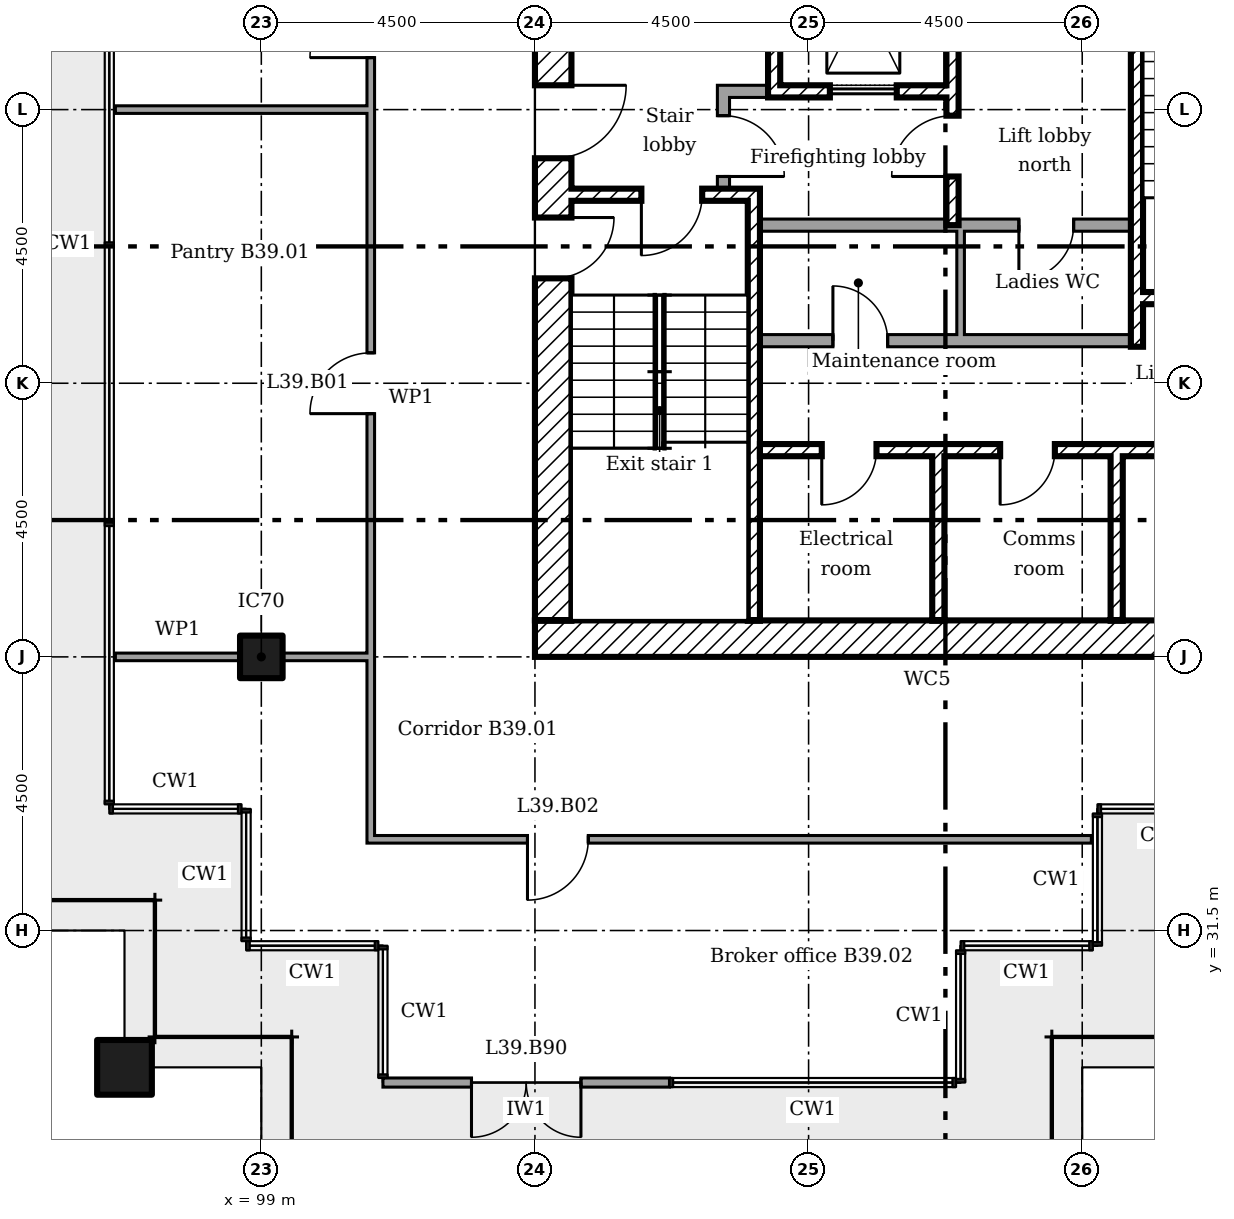
"""IFC4 building model, lengths in metres.
Left out: names, types, materials, properties, quantities, classifications, styles, units other than length and angle.
Written with IfcOpenShell. Run it as: python <this file> out.ifc"""

import sys

from ifc_helpers import new_model, si_unit, direction, frame, frame_2d, origin, origin_2d, place, context, subcontext, project, spatial, rectangle, extrude, element, fill, save


model = new_model("IFC4")
c1 = context("Model", 3, precision=1e-05, world=origin(), true_north=direction((0.0, 1.0)))
c2 = subcontext(c1, "Body", "Model", "MODEL_VIEW")
j1 = project(units=[si_unit("LENGTHUNIT", "METRE"), si_unit("PLANEANGLEUNIT", "RADIAN")], contexts=[c1])
p1 = place(None, origin())
s1 = spatial("IfcSite", under=j1, at=p1, CompositionType="ELEMENT")
p2 = place(p1, origin())
s2 = spatial("IfcBuilding", under=s1, at=p2, CompositionType="ELEMENT")
p3 = place(p2, frame((0.0, 0.0, 158.2)))
s3 = spatial("IfcBuildingStorey", under=s2, at=p3, CompositionType="ELEMENT", Elevation=158.2)
p4 = place(p3, frame((96.75, 29.25, 0.0)))
e1 = element("IfcColumn", 1, at=p4, inside=s3, PredefinedType="COLUMN", context=c2, shape_type="SweptSolid", body=[
    extrude(rectangle(XDim=0.9, YDim=0.9, at=origin_2d()), origin(), (0.0, 0.0, 1.0), 3.6),
])
p5 = place(p3, frame((99.0, 36.0, 0.0)))
e2 = element("IfcColumn", 2, at=p5, inside=s3, PredefinedType="COLUMN", context=c2, shape_type="SweptSolid", body=[
    extrude(rectangle(XDim=0.7, YDim=0.7, at=origin_2d()), origin(), (0.0, 0.0, 1.0), 3.6),
])
p6 = place(p3, frame((101.0, 29.0, 0.0)))
e3 = element("IfcWall", 3, at=p6, inside=s3, PredefinedType="SOLIDWALL", context=c2, shape_type="SweptSolid", body=[
    extrude(rectangle(XDim=4.712, YDim=0.15, at=frame_2d((2.356, 0.0))), origin(), (0.0, 0.0, 1.0), 3.45),
])
p7 = place(p6, frame((1.456, 0.0, 0.0)))
e4 = element("IfcOpeningElement", 4, at=p7, cuts=e3, PredefinedType="OPENING", context=c2, shape_type="SweptSolid", body=[
    extrude(rectangle(XDim=1.8, YDim=2.4, at=frame_2d((0.9, 1.2))), frame((0.0, 0.085, 0.0), z_axis=(0.0, -1.0, 0.0), x_axis=(1.0, 0.0, 0.0)), (0.0, 0.0, 1.0), 0.17),
])
p8 = place(p3, frame((103.5, 36.3, 0.0)))
e5 = element("IfcWall", 5, at=p8, inside=s3, PredefinedType="SHEAR", context=c2, shape_type="SweptSolid", body=[
    extrude(rectangle(XDim=12.9, YDim=0.6, at=frame_2d((6.45, 0.0))), origin(), (0.0, 0.0, 1.0), 3.35),
])
p9 = place(p3, frame((103.8, 36.6, 0.0), z_axis=(0.0, 0.0, 1.0), x_axis=(0.0, 1.0, 0.0)))
e6 = element("IfcWall", 6, at=p9, inside=s3, PredefinedType="SHEAR", context=c2, shape_type="SweptSolid", body=[
    extrude(rectangle(XDim=12.3, YDim=0.6, at=frame_2d((6.15, 0.0))), origin(), (0.0, 0.0, 1.0), 3.35),
])
p10 = place(p9, frame((7.6, 0.0, 0.0)))
e7 = element("IfcOpeningElement", 7, at=p10, cuts=e6, PredefinedType="OPENING", context=c2, shape_type="SweptSolid", body=[
    extrude(rectangle(XDim=1.2, YDim=2.1, at=frame_2d((0.6, 1.05))), frame((0.0, 0.31, 0.0), z_axis=(0.0, -1.0, 0.0), x_axis=(1.0, 0.0, 0.0)), (0.0, 0.0, 1.0), 0.62),
])
p11 = place(p9, frame((5.625, 0.0, 0.0)))
e8 = element("IfcOpeningElement", 8, at=p11, cuts=e6, PredefinedType="OPENING", context=c2, shape_type="SweptSolid", body=[
    extrude(rectangle(XDim=1.0, YDim=2.1, at=frame_2d((0.5, 1.05))), frame((0.0, 0.31, 0.0), z_axis=(0.0, -1.0, 0.0), x_axis=(1.0, 0.0, 0.0)), (0.0, 0.0, 1.0), 0.62),
])
p12 = place(p3, frame((107.433, 48.9, 0.0), z_axis=(0.0, 0.0, 1.0), x_axis=(0.0, -1.0, 0.0)))
e9 = element("IfcWall", 9, at=p12, inside=s3, PredefinedType="SHEAR", context=c2, shape_type="SweptSolid", body=[
    extrude(rectangle(XDim=3.7, YDim=0.2, at=frame_2d((1.85, 0.0))), origin(), (0.0, 0.0, 1.0), 3.35),
])
p13 = place(p3, frame((110.367, 48.9, 0.0), z_axis=(0.0, 0.0, 1.0), x_axis=(0.0, -1.0, 0.0)))
e10 = element("IfcWall", 10, at=p13, inside=s3, PredefinedType="SHEAR", context=c2, shape_type="SweptSolid", body=[
    extrude(rectangle(XDim=5.8, YDim=0.2, at=frame_2d((2.9, 0.0))), origin(), (0.0, 0.0, 1.0), 3.35),
])
p14 = place(p13, frame((4.0, 0.0, 0.0)))
e11 = element("IfcOpeningElement", 11, at=p14, cuts=e10, PredefinedType="OPENING", context=c2, shape_type="SweptSolid", body=[
    extrude(rectangle(XDim=1.0, YDim=2.1, at=frame_2d((0.5, 1.05))), frame((0.0, 0.11, 0.0), z_axis=(0.0, -1.0, 0.0), x_axis=(1.0, 0.0, 0.0)), (0.0, 0.0, 1.0), 0.22),
])
for number, where, z_axis, x_axis in (
    (12, (110.133, 36.6, 0.0), (0.0, 0.0, 1.0), (0.0, 1.0, 0.0)),
    (13, (113.067, 36.6, 0.0), (0.0, 0.0, 1.0), (0.0, 1.0, 0.0)),
):
    element("IfcWall", number, at=place(p3, frame(where, z_axis=z_axis, x_axis=x_axis)), inside=s3, PredefinedType="SHEAR", context=c2, shape_type="SweptSolid", body=[
        extrude(rectangle(XDim=2.7, YDim=0.2, at=frame_2d((1.35, 0.0))), origin(), (0.0, 0.0, 1.0), 3.35),
    ])
p15 = place(p3, frame((106.5, 45.3, 0.0)))
e14 = element("IfcWall", 14, at=p15, inside=s3, PredefinedType="PARTITIONING", context=c2, shape_type="SweptSolid", body=[
    extrude(rectangle(XDim=0.833, YDim=0.2, at=frame_2d((0.417, 0.0))), origin(), (0.0, 0.0, 1.0), 3.35),
])
p16 = place(p3, frame((106.6, 43.7, 0.0), z_axis=(0.0, 0.0, 1.0), x_axis=(0.0, 1.0, 0.0)))
e15 = element("IfcWall", 15, at=p16, inside=s3, PredefinedType="PARTITIONING", context=c2, shape_type="SweptSolid", body=[
    extrude(rectangle(XDim=1.5, YDim=0.2, at=frame_2d((0.75, 0.0))), origin(), (0.0, 0.0, 1.0), 3.35),
])
p17 = place(p16, frame((0.2, 0.0, 0.0)))
e16 = element("IfcOpeningElement", 16, at=p17, cuts=e15, PredefinedType="OPENING", context=c2, shape_type="SweptSolid", body=[
    extrude(rectangle(XDim=1.0, YDim=2.1, at=frame_2d((0.5, 1.05))), frame((0.0, 0.11, 0.0), z_axis=(0.0, -1.0, 0.0), x_axis=(1.0, 0.0, 0.0)), (0.0, 0.0, 1.0), 0.22),
])
p18 = place(p3, frame((107.533, 45.3, 0.0)))
e17 = element("IfcWall", 17, at=p18, inside=s3, PredefinedType="SHEAR", context=c2, shape_type="SweptSolid", body=[
    extrude(rectangle(XDim=2.733, YDim=0.2, at=frame_2d((1.367, 0.0))), origin(), (0.0, 0.0, 1.0), 3.35),
])
p19 = place(p18, frame((0.817, 0.0, 0.0)))
e18 = element("IfcOpeningElement", 18, at=p19, cuts=e17, PredefinedType="OPENING", context=c2, shape_type="SweptSolid", body=[
    extrude(rectangle(XDim=1.1, YDim=2.1, at=frame_2d((0.55, 1.05))), frame((0.0, 0.11, 0.0), z_axis=(0.0, -1.0, 0.0), x_axis=(1.0, 0.0, 0.0)), (0.0, 0.0, 1.0), 0.22),
])
p20 = place(p3, frame((107.2, 39.4, 0.0)))
e19 = element("IfcWall", 19, at=p20, inside=s3, PredefinedType="SHEAR", context=c2, shape_type="SweptSolid", body=[
    extrude(rectangle(XDim=9.2, YDim=0.2, at=frame_2d((4.6, 0.0))), origin(), (0.0, 0.0, 1.0), 3.35),
])
p21 = place(p20, frame((1.017, 0.0, 0.0)))
e20 = element("IfcOpeningElement", 20, at=p21, cuts=e19, PredefinedType="OPENING", context=c2, shape_type="SweptSolid", body=[
    extrude(rectangle(XDim=0.9, YDim=2.1, at=frame_2d((0.45, 1.05))), frame((0.0, 0.11, 0.0), z_axis=(0.0, -1.0, 0.0), x_axis=(1.0, 0.0, 0.0)), (0.0, 0.0, 1.0), 0.22),
])
p22 = place(p20, frame((3.95, 0.0, 0.0)))
e21 = element("IfcOpeningElement", 21, at=p22, cuts=e19, PredefinedType="OPENING", context=c2, shape_type="SweptSolid", body=[
    extrude(rectangle(XDim=0.9, YDim=2.1, at=frame_2d((0.45, 1.05))), frame((0.0, 0.11, 0.0), z_axis=(0.0, -1.0, 0.0), x_axis=(1.0, 0.0, 0.0)), (0.0, 0.0, 1.0), 0.22),
])
p23 = place(p20, frame((6.883, 0.0, 0.0)))
e22 = element("IfcOpeningElement", 22, at=p23, cuts=e19, PredefinedType="OPENING", context=c2, shape_type="SweptSolid", body=[
    extrude(rectangle(XDim=0.9, YDim=2.1, at=frame_2d((0.45, 1.05))), frame((0.0, 0.11, 0.0), z_axis=(0.0, -1.0, 0.0), x_axis=(1.0, 0.0, 0.0)), (0.0, 0.0, 1.0), 0.22),
])
p24 = place(p3, frame((107.1, 36.6, 0.0), z_axis=(0.0, 0.0, 1.0), x_axis=(0.0, 1.0, 0.0)))
e23 = element("IfcWall", 23, at=p24, inside=s3, PredefinedType="SHEAR", context=c2, shape_type="SweptSolid", body=[
    extrude(rectangle(XDim=7.1, YDim=0.2, at=frame_2d((3.55, 0.0))), origin(), (0.0, 0.0, 1.0), 3.35),
])
p25 = place(p3, frame((104.1, 43.6, 0.0)))
e24 = element("IfcWall", 24, at=p25, inside=s3, PredefinedType="SHEAR", context=c2, shape_type="SweptSolid", body=[
    extrude(rectangle(XDim=2.9, YDim=0.2, at=frame_2d((1.45, 0.0))), origin(), (0.0, 0.0, 1.0), 3.35),
])
p26 = place(p25, frame((1.15, 0.0, 0.0)))
e25 = element("IfcOpeningElement", 25, at=p26, cuts=e24, PredefinedType="OPENING", context=c2, shape_type="SweptSolid", body=[
    extrude(rectangle(XDim=1.0, YDim=2.1, at=frame_2d((0.5, 1.05))), frame((0.0, 0.11, 0.0), z_axis=(0.0, -1.0, 0.0), x_axis=(1.0, 0.0, 0.0)), (0.0, 0.0, 1.0), 0.22),
])
p27 = place(p3, frame((113.5, 41.9, 0.0)))
e26 = element("IfcWall", 26, at=p27, inside=s3, PredefinedType="SHEAR", context=c2, shape_type="SweptSolid", body=[
    extrude(rectangle(XDim=2.9, YDim=0.2, at=frame_2d((1.45, 0.0))), origin(), (0.0, 0.0, 1.0), 3.35),
])
p28 = place(p27, frame((0.75, 0.0, 0.0)))
e27 = element("IfcOpeningElement", 27, at=p28, cuts=e26, PredefinedType="OPENING", context=c2, shape_type="SweptSolid", body=[
    extrude(rectangle(XDim=1.0, YDim=2.1, at=frame_2d((0.5, 1.05))), frame((0.0, 0.11, 0.0), z_axis=(0.0, -1.0, 0.0), x_axis=(1.0, 0.0, 0.0)), (0.0, 0.0, 1.0), 0.22),
])
p29 = place(p3, frame((113.4, 41.1, 0.0), z_axis=(0.0, 0.0, 1.0), x_axis=(0.0, 1.0, 0.0)))
e28 = element("IfcWall", 28, at=p29, inside=s3, PredefinedType="SHEAR", context=c2, shape_type="SweptSolid", body=[
    extrude(rectangle(XDim=7.8, YDim=0.2, at=frame_2d((3.9, 0.0))), origin(), (0.0, 0.0, 1.0), 3.35),
])
p30 = place(p3, frame((107.2, 43.1, 0.0)))
e29 = element("IfcWall", 29, at=p30, inside=s3, PredefinedType="PARTITIONING", context=c2, shape_type="SweptSolid", body=[
    extrude(rectangle(XDim=6.1, YDim=0.2, at=frame_2d((3.05, 0.0))), origin(), (0.0, 0.0, 1.0), 3.35),
])
p31 = place(p30, frame((4.259, 0.0, 0.0)))
e30 = element("IfcOpeningElement", 30, at=p31, cuts=e29, PredefinedType="OPENING", context=c2, shape_type="SweptSolid", body=[
    extrude(rectangle(XDim=0.9, YDim=2.1, at=frame_2d((0.45, 1.05))), frame((0.0, 0.11, 0.0), z_axis=(0.0, -1.0, 0.0), x_axis=(1.0, 0.0, 0.0)), (0.0, 0.0, 1.0), 0.22),
])
p32 = place(p3, frame((107.2, 41.2, 0.0)))
e31 = element("IfcWall", 31, at=p32, inside=s3, PredefinedType="PARTITIONING", context=c2, shape_type="SweptSolid", body=[
    extrude(rectangle(XDim=6.1, YDim=0.2, at=frame_2d((3.05, 0.0))), origin(), (0.0, 0.0, 1.0), 3.35),
])
p33 = place(p32, frame((1.2, 0.0, 0.0)))
e32 = element("IfcOpeningElement", 32, at=p33, cuts=e31, PredefinedType="OPENING", context=c2, shape_type="SweptSolid", body=[
    extrude(rectangle(XDim=0.9, YDim=2.1, at=frame_2d((0.45, 1.05))), frame((0.0, 0.11, 0.0), z_axis=(0.0, -1.0, 0.0), x_axis=(1.0, 0.0, 0.0)), (0.0, 0.0, 1.0), 0.22),
])
p34 = place(p3, frame((110.5, 41.3, 0.0), z_axis=(0.0, 0.0, 1.0), x_axis=(0.0, 1.0, 0.0)))
e33 = element("IfcWall", 33, at=p34, inside=s3, PredefinedType="PARTITIONING", context=c2, shape_type="SweptSolid", body=[
    extrude(rectangle(XDim=1.7, YDim=0.125, at=frame_2d((0.85, 0.0))), origin(), (0.0, 0.0, 1.0), 3.35),
])
p35 = place(p3, frame((100.738, 33.0, 0.0)))
e34 = element("IfcWall", 34, at=p35, inside=s3, PredefinedType="PARTITIONING", context=c2, shape_type="SweptSolid", body=[
    extrude(rectangle(XDim=11.912, YDim=0.125, at=frame_2d((5.956, 0.0))), origin(), (0.0, 0.0, 1.0), 3.45),
])
p36 = place(p35, frame((2.639, 0.0, 0.0)))
e35 = element("IfcOpeningElement", 35, at=p36, cuts=e34, PredefinedType="OPENING", context=c2, shape_type="SweptSolid", body=[
    extrude(rectangle(XDim=1.0, YDim=2.1, at=frame_2d((0.5, 1.05))), frame((0.0, 0.073, 0.0), z_axis=(0.0, -1.0, 0.0), x_axis=(1.0, 0.0, 0.0)), (0.0, 0.0, 1.0), 0.145),
])
p37 = place(p3, frame((96.6, 36.0, 0.0)))
e36 = element("IfcWall", 36, at=p37, inside=s3, PredefinedType="PARTITIONING", context=c2, shape_type="SweptSolid", body=[
    extrude(rectangle(XDim=2.05, YDim=0.125, at=frame_2d((1.025, 0.0))), origin(), (0.0, 0.0, 1.0), 2.842),
])
p38 = place(p3, frame((99.35, 36.0, 0.0)))
e37 = element("IfcWall", 37, at=p38, inside=s3, PredefinedType="PARTITIONING", context=c2, shape_type="SweptSolid", body=[
    extrude(rectangle(XDim=1.45, YDim=0.125, at=frame_2d((0.725, 0.0))), origin(), (0.0, 0.0, 1.0), 2.842),
])
p39 = place(p3, frame((96.6, 45.0, 0.0)))
e38 = element("IfcWall", 38, at=p39, inside=s3, PredefinedType="PARTITIONING", context=c2, shape_type="SweptSolid", body=[
    extrude(rectangle(XDim=4.2, YDim=0.125, at=frame_2d((2.1, 0.0))), origin(), (0.0, 0.0, 1.0), 2.851),
])
p40 = place(p3, frame((100.8, 33.062, 0.0), z_axis=(0.0, 0.0, 1.0), x_axis=(0.0, 1.0, 0.0)))
e39 = element("IfcWall", 39, at=p40, inside=s3, PredefinedType="PARTITIONING", context=c2, shape_type="SweptSolid", body=[
    extrude(rectangle(XDim=14.375, YDim=0.125, at=frame_2d((7.188, 0.0))), origin(), (0.0, 0.0, 1.0), 3.45),
])
p41 = place(p40, frame((6.938, 0.0, 0.0)))
e40 = element("IfcOpeningElement", 40, at=p41, cuts=e39, PredefinedType="OPENING", context=c2, shape_type="SweptSolid", body=[
    extrude(rectangle(XDim=1.0, YDim=2.1, at=frame_2d((0.5, 1.05))), frame((0.0, 0.073, 0.0), z_axis=(0.0, -1.0, 0.0), x_axis=(1.0, 0.0, 0.0)), (0.0, 0.0, 1.0), 0.145),
])
p42 = place(p40, frame((12.792, 0.0, 0.0)))
e41 = element("IfcOpeningElement", 41, at=p42, cuts=e39, PredefinedType="OPENING", context=c2, shape_type="SweptSolid", body=[
    extrude(rectangle(XDim=1.0, YDim=2.1, at=frame_2d((0.5, 1.05))), frame((0.0, 0.073, 0.0), z_axis=(0.0, -1.0, 0.0), x_axis=(1.0, 0.0, 0.0)), (0.0, 0.0, 1.0), 0.145),
])
p43 = place(p7, frame((1.8, 0.0, 0.0), x_axis=(-1.0, 0.0, 0.0)))
e42 = element("IfcDoor", 42, at=p43, inside=s3, OperationType="DOUBLE_DOOR_DOUBLE_SWING", PredefinedType="NOTDEFINED", context=c2, shape_type="SweptSolid", body=[
    extrude(rectangle(XDim=1.8, YDim=2.4, at=frame_2d((0.9, 1.2))), frame((0.0, 0.025, 0.0), z_axis=(0.0, -1.0, 0.0), x_axis=(1.0, 0.0, 0.0)), (0.0, 0.0, 1.0), 0.05),
])
fill(e4, e42)
p44 = place(p10, frame((1.2, 0.0, 0.0), x_axis=(-1.0, 0.0, 0.0)))
e43 = element("IfcDoor", 43, at=p44, inside=s3, OperationType="SINGLE_SWING_RIGHT", PredefinedType="DOOR", context=c2, shape_type="SweptSolid", body=[
    extrude(rectangle(XDim=1.2, YDim=2.1, at=frame_2d((0.6, 1.05))), frame((0.0, 0.025, 0.0), z_axis=(0.0, -1.0, 0.0), x_axis=(1.0, 0.0, 0.0)), (0.0, 0.0, 1.0), 0.05),
])
fill(e7, e43)
p45 = place(p26, frame((1.0, 0.0, 0.0), x_axis=(-1.0, 0.0, 0.0)))
e44 = element("IfcDoor", 44, at=p45, inside=s3, OperationType="SINGLE_SWING_LEFT", PredefinedType="DOOR", context=c2, shape_type="SweptSolid", body=[
    extrude(rectangle(XDim=1.0, YDim=2.1, at=frame_2d((0.5, 1.05))), frame((0.0, 0.025, 0.0), z_axis=(0.0, -1.0, 0.0), x_axis=(1.0, 0.0, 0.0)), (0.0, 0.0, 1.0), 0.05),
])
fill(e25, e44)
p46 = place(p11, frame((1.0, 0.0, 0.0), x_axis=(-1.0, 0.0, 0.0)))
e45 = element("IfcDoor", 45, at=p46, inside=s3, OperationType="SINGLE_SWING_RIGHT", PredefinedType="DOOR", context=c2, shape_type="SweptSolid", body=[
    extrude(rectangle(XDim=1.0, YDim=2.1, at=frame_2d((0.5, 1.05))), frame((0.0, 0.025, 0.0), z_axis=(0.0, -1.0, 0.0), x_axis=(1.0, 0.0, 0.0)), (0.0, 0.0, 1.0), 0.05),
])
fill(e8, e45)
p47 = place(p14, frame((1.0, 0.0, 0.0), x_axis=(-1.0, 0.0, 0.0)))
e46 = element("IfcDoor", 46, at=p47, inside=s3, OperationType="SINGLE_SWING_RIGHT", PredefinedType="DOOR", context=c2, shape_type="SweptSolid", body=[
    extrude(rectangle(XDim=1.0, YDim=2.1, at=frame_2d((0.5, 1.05))), frame((0.0, 0.025, 0.0), z_axis=(0.0, -1.0, 0.0), x_axis=(1.0, 0.0, 0.0)), (0.0, 0.0, 1.0), 0.05),
])
fill(e11, e46)
p48 = place(p17, frame((1.0, 0.0, 0.0), x_axis=(-1.0, 0.0, 0.0)))
e47 = element("IfcDoor", 47, at=p48, inside=s3, OperationType="SINGLE_SWING_LEFT", PredefinedType="DOOR", context=c2, shape_type="SweptSolid", body=[
    extrude(rectangle(XDim=1.0, YDim=2.1, at=frame_2d((0.5, 1.05))), frame((0.0, 0.025, 0.0), z_axis=(0.0, -1.0, 0.0), x_axis=(1.0, 0.0, 0.0)), (0.0, 0.0, 1.0), 0.05),
])
fill(e16, e47)
p49 = place(p21, frame((0.9, 0.0, 0.0), x_axis=(-1.0, 0.0, 0.0)))
e48 = element("IfcDoor", 48, at=p49, inside=s3, OperationType="SINGLE_SWING_LEFT", PredefinedType="DOOR", context=c2, shape_type="SweptSolid", body=[
    extrude(rectangle(XDim=0.9, YDim=2.1, at=frame_2d((0.45, 1.05))), frame((0.0, 0.025, 0.0), z_axis=(0.0, -1.0, 0.0), x_axis=(1.0, 0.0, 0.0)), (0.0, 0.0, 1.0), 0.05),
])
fill(e20, e48)
p50 = place(p22, frame((0.9, 0.0, 0.0), x_axis=(-1.0, 0.0, 0.0)))
e49 = element("IfcDoor", 49, at=p50, inside=s3, OperationType="SINGLE_SWING_LEFT", PredefinedType="DOOR", context=c2, shape_type="SweptSolid", body=[
    extrude(rectangle(XDim=0.9, YDim=2.1, at=frame_2d((0.45, 1.05))), frame((0.0, 0.025, 0.0), z_axis=(0.0, -1.0, 0.0), x_axis=(1.0, 0.0, 0.0)), (0.0, 0.0, 1.0), 0.05),
])
fill(e21, e49)
p51 = place(p33, origin())
e50 = element("IfcDoor", 50, at=p51, inside=s3, OperationType="SINGLE_SWING_RIGHT", PredefinedType="DOOR", context=c2, shape_type="SweptSolid", body=[
    extrude(rectangle(XDim=0.9, YDim=2.1, at=frame_2d((0.45, 1.05))), frame((0.0, 0.025, 0.0), z_axis=(0.0, -1.0, 0.0), x_axis=(1.0, 0.0, 0.0)), (0.0, 0.0, 1.0), 0.05),
])
fill(e32, e50)
p52 = place(p31, frame((0.9, 0.0, 0.0), x_axis=(-1.0, 0.0, 0.0)))
e51 = element("IfcDoor", 51, at=p52, inside=s3, OperationType="SINGLE_SWING_LEFT", PredefinedType="DOOR", context=c2, shape_type="SweptSolid", body=[
    extrude(rectangle(XDim=0.9, YDim=2.1, at=frame_2d((0.45, 1.05))), frame((0.0, 0.025, 0.0), z_axis=(0.0, -1.0, 0.0), x_axis=(1.0, 0.0, 0.0)), (0.0, 0.0, 1.0), 0.05),
])
fill(e30, e51)
p53 = place(p19, origin())
e52 = element("IfcDoor", 52, at=p53, inside=s3, OperationType="SLIDING_TO_LEFT", PredefinedType="DOOR", context=c2, shape_type="SweptSolid", body=[
    extrude(rectangle(XDim=1.1, YDim=2.1, at=frame_2d((0.55, 1.05))), frame((0.0, 0.025, 0.0), z_axis=(0.0, -1.0, 0.0), x_axis=(1.0, 0.0, 0.0)), (0.0, 0.0, 1.0), 0.05),
])
fill(e18, e52)
p54 = place(p41, origin())
e53 = element("IfcDoor", 53, at=p54, inside=s3, OperationType="SINGLE_SWING_RIGHT", PredefinedType="DOOR", context=c2, shape_type="SweptSolid", body=[
    extrude(rectangle(XDim=1.0, YDim=2.1, at=frame_2d((0.5, 1.05))), frame((0.0, 0.025, 0.0), z_axis=(0.0, -1.0, 0.0), x_axis=(1.0, 0.0, 0.0)), (0.0, 0.0, 1.0), 0.05),
])
fill(e40, e53)
p55 = place(p36, frame((1.0, 0.0, 0.0), x_axis=(-1.0, 0.0, 0.0)))
e54 = element("IfcDoor", 54, at=p55, inside=s3, OperationType="SINGLE_SWING_LEFT", PredefinedType="DOOR", context=c2, shape_type="SweptSolid", body=[
    extrude(rectangle(XDim=1.0, YDim=2.1, at=frame_2d((0.5, 1.05))), frame((0.0, 0.025, 0.0), z_axis=(0.0, -1.0, 0.0), x_axis=(1.0, 0.0, 0.0)), (0.0, 0.0, 1.0), 0.05),
])
fill(e35, e54)
p56 = place(p42, origin())
e55 = element("IfcDoor", 55, at=p56, inside=s3, OperationType="SINGLE_SWING_RIGHT", PredefinedType="DOOR", context=c2, shape_type="SweptSolid", body=[
    extrude(rectangle(XDim=1.0, YDim=2.1, at=frame_2d((0.5, 1.05))), frame((0.0, 0.025, 0.0), z_axis=(0.0, -1.0, 0.0), x_axis=(1.0, 0.0, 0.0)), (0.0, 0.0, 1.0), 0.05),
])
fill(e41, e55)
save(model, sys.argv[1])
